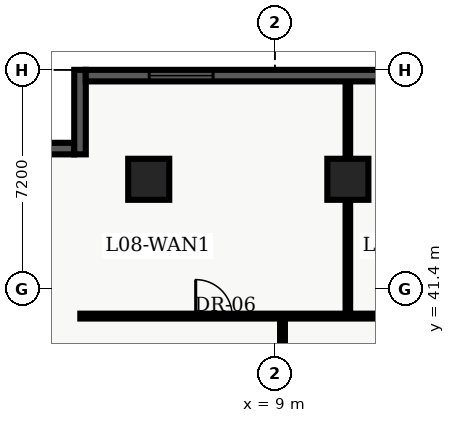
"""IFC4 building model, lengths in metres.
Left out: names, types, materials, properties, quantities, classifications, styles, units other than length and angle.
Written with IfcOpenShell. Run it as: python <this file> out.ifc"""

import sys

from ifc_helpers import new_model, entity, si_unit, converted_unit, direction, frame, origin_with_axes, origin_2d_with_axis, place, context, subcontext, project, spatial, polyline, rectangle, outline, extrude, element, fill, save


model = new_model("IFC4")
c1 = context("Model", 3, precision=1e-05, world=origin_with_axes(), true_north=direction((0.0, 1.0)))
c2 = subcontext(c1, "Body", "Model", "MODEL_VIEW")
j1 = project(units=[si_unit("LENGTHUNIT", "METRE"), converted_unit("PLANEANGLEUNIT", "DEGREE", entity("IfcPlaneAngleMeasure", 0.017), si_unit("PLANEANGLEUNIT", "RADIAN"), dimensions=[0, 0, 0, 0, 0, 0, 0])], contexts=[c1])
p1 = place(None, origin_with_axes())
s1 = spatial("IfcSite", under=j1, at=p1, CompositionType="ELEMENT")
p2 = place(p1, origin_with_axes())
s2 = spatial("IfcBuilding", under=s1, at=p2, CompositionType="ELEMENT")
p3 = place(p2, frame((0.0, 0.0, 36.6), z_axis=(0.0, 0.0, 1.0), x_axis=(1.0, 0.0, 0.0)))
s3 = spatial("IfcBuildingStorey", under=s2, at=p3, CompositionType="ELEMENT", Elevation=36.6)
for number, where, z_axis, x_axis in (
    (1, (11.4, 45.0, 0.0), (0.0, 0.0, 1.0), (1.0, 0.0, 0.0)),
    (2, (4.85, 45.0, 0.0), (0.0, 0.0, 1.0), (1.0, 0.0, 0.0)),
):
    element("IfcColumn", number, at=place(p3, frame(where, z_axis=z_axis, x_axis=x_axis)), inside=s3, PredefinedType="COLUMN", context=c2, shape_type="SweptSolid", body=[
        extrude(rectangle(XDim=1.35, YDim=1.35, at=origin_2d_with_axis()), origin_with_axes(), (0.0, 0.0, 1.0), 3.9),
    ])
p4 = place(p3, frame((2.6, 40.5, 0.0), z_axis=(0.0, 0.0, 1.0), x_axis=(1.0, 0.0, 0.0)))
e3 = element("IfcWall", 3, at=p4, inside=s3, PredefinedType="PARTITIONING", context=c2, shape_type="SweptSolid", body=[
    extrude(outline(polyline([(0.0, -0.08), (18.65, -0.08), (18.65, 0.08), (0.0, 0.08), (0.0, -0.08)])), origin_with_axes(), (0.0, 0.0, 1.0), 2.7),
])
p5 = place(p4, frame((4.395, 0.0, 0.0), z_axis=(0.0, 0.0, 1.0), x_axis=(1.0, 0.0, 0.0)))
e4 = element("IfcOpeningElement", 4, at=p5, cuts=e3, PredefinedType="OPENING", context=c2, shape_type="SweptSolid", body=[
    extrude(rectangle(XDim=1.2, YDim=0.18, at=origin_2d_with_axis()), origin_with_axes(), (0.0, 0.0, 1.0), 2.2),
])
p6 = place(p4, frame((12.61, 0.0, 0.0), z_axis=(0.0, 0.0, 1.0), x_axis=(1.0, 0.0, 0.0)))
e5 = element("IfcOpeningElement", 5, at=p6, cuts=e3, PredefinedType="OPENING", context=c2, shape_type="SweptSolid", body=[
    extrude(rectangle(XDim=1.0, YDim=0.18, at=origin_2d_with_axis()), origin_with_axes(), (0.0, 0.0, 1.0), 2.15),
])
p7 = place(p3, frame((9.25, 24.4, 0.0), z_axis=(0.0, 0.0, 1.0), x_axis=(0.0, 1.0, 0.0)))
e6 = element("IfcWall", 6, at=p7, inside=s3, PredefinedType="PARTITIONING", context=c2, shape_type="SweptSolid", body=[
    extrude(outline(polyline([(0.0, -0.08), (16.1, -0.08), (16.1, 0.08), (0.0, 0.08), (0.0, -0.08)])), origin_with_axes(), (0.0, 0.0, 1.0), 2.7),
])
p8 = place(p7, frame((1.958, 0.0, 0.0), z_axis=(0.0, 0.0, 1.0), x_axis=(1.0, 0.0, 0.0)))
e7 = element("IfcOpeningElement", 7, at=p8, cuts=e6, PredefinedType="OPENING", context=c2, shape_type="SweptSolid", body=[
    extrude(rectangle(XDim=1.0, YDim=0.18, at=origin_2d_with_axis()), origin_with_axes(), (0.0, 0.0, 1.0), 2.15),
])
p9 = place(p7, frame((10.992, 0.0, 0.0), z_axis=(0.0, 0.0, 1.0), x_axis=(1.0, 0.0, 0.0)))
e8 = element("IfcOpeningElement", 8, at=p9, cuts=e6, PredefinedType="OPENING", context=c2, shape_type="SweptSolid", body=[
    extrude(rectangle(XDim=1.0, YDim=0.18, at=origin_2d_with_axis()), origin_with_axes(), (0.0, 0.0, 1.0), 2.15),
])
p10 = place(p3, frame((11.4, 40.6, 0.0), z_axis=(0.0, 0.0, 1.0), x_axis=(0.0, 1.0, 0.0)))
e9 = element("IfcWall", 9, at=p10, inside=s3, PredefinedType="PARTITIONING", context=c2, shape_type="SweptSolid", body=[
    extrude(outline(polyline([(0.0, -0.075), (7.64, -0.075), (7.64, 0.075), (0.0, 0.075), (0.0, -0.075)])), origin_with_axes(), (0.0, 0.0, 1.0), 2.7),
])
p11 = place(p3, frame((0.38, 46.01, 0.0), z_axis=(0.0, 0.0, 1.0), x_axis=(1.0, 0.0, 0.0)))
e10 = element("IfcWall", 10, at=p11, inside=s3, PredefinedType="SOLIDWALL", context=c2, shape_type="SweptSolid", body=[
    extrude(outline(polyline([(0.0, -0.19), (2.02, -0.19), (2.02, 0.19), (0.0, 0.19), (0.0, -0.19)])), origin_with_axes(), (0.0, 0.0, 1.0), 3.66),
])
p12 = place(p3, frame((2.59, 45.82, 0.0), z_axis=(0.0, 0.0, 1.0), x_axis=(0.0, 1.0, 0.0)))
e11 = element("IfcWall", 11, at=p12, inside=s3, PredefinedType="SOLIDWALL", context=c2, shape_type="SweptSolid", body=[
    extrude(outline(polyline([(0.0, -0.19), (2.78, -0.19), (2.78, 0.19), (0.0, 0.19), (0.0, -0.19)])), origin_with_axes(), (0.0, 0.0, 1.0), 3.66),
])
p13 = place(p3, frame((2.78, 48.41, 0.0), z_axis=(0.0, 0.0, 1.0), x_axis=(1.0, 0.0, 0.0)))
e12 = element("IfcWall", 12, at=p13, inside=s3, PredefinedType="SOLIDWALL", context=c2, shape_type="SweptSolid", body=[
    extrude(outline(polyline([(0.0, -0.19), (16.42, -0.19), (16.42, 0.19), (0.0, 0.19), (0.0, -0.19)])), origin_with_axes(), (0.0, 0.0, 1.0), 3.66),
])
p14 = place(p13, frame((3.137, 0.0, 0.45), z_axis=(0.0, 0.0, 1.0), x_axis=(1.0, 0.0, 0.0)))
e13 = element("IfcOpeningElement", 13, at=p14, cuts=e12, PredefinedType="OPENING", context=c2, shape_type="SweptSolid", body=[
    extrude(rectangle(XDim=2.1, YDim=0.4, at=origin_2d_with_axis()), origin_with_axes(), (0.0, 0.0, 1.0), 2.2),
])
p15 = place(p13, frame((13.283, 0.0, 0.45), z_axis=(0.0, 0.0, 1.0), x_axis=(1.0, 0.0, 0.0)))
e14 = element("IfcOpeningElement", 14, at=p15, cuts=e12, PredefinedType="OPENING", context=c2, shape_type="SweptSolid", body=[
    extrude(rectangle(XDim=2.1, YDim=0.4, at=origin_2d_with_axis()), origin_with_axes(), (0.0, 0.0, 1.0), 2.2),
])
p16 = place(p4, frame((4.395, 0.0, 0.0), z_axis=(0.0, 0.0, 1.0), x_axis=(1.0, 0.0, 0.0)))
e15 = element("IfcDoor", 15, at=p16, inside=s3, OperationType="SINGLE_SWING_LEFT", PredefinedType="DOOR", context=c2, shape_type="SweptSolid", body=[
    extrude(rectangle(XDim=1.2, YDim=0.09, at=origin_2d_with_axis()), origin_with_axes(), (0.0, 0.0, 1.0), 2.2),
])
fill(e4, e15)
p17 = place(p13, frame((3.137, 0.0, 0.45), z_axis=(0.0, 0.0, 1.0), x_axis=(1.0, 0.0, 0.0)))
e16 = element("IfcWindow", 16, at=p17, inside=s3, PredefinedType="WINDOW", context=c2, shape_type="SweptSolid", body=[
    extrude(rectangle(XDim=2.1, YDim=0.09, at=origin_2d_with_axis()), origin_with_axes(), (0.0, 0.0, 1.0), 2.2),
])
fill(e13, e16)
save(model, sys.argv[1])
